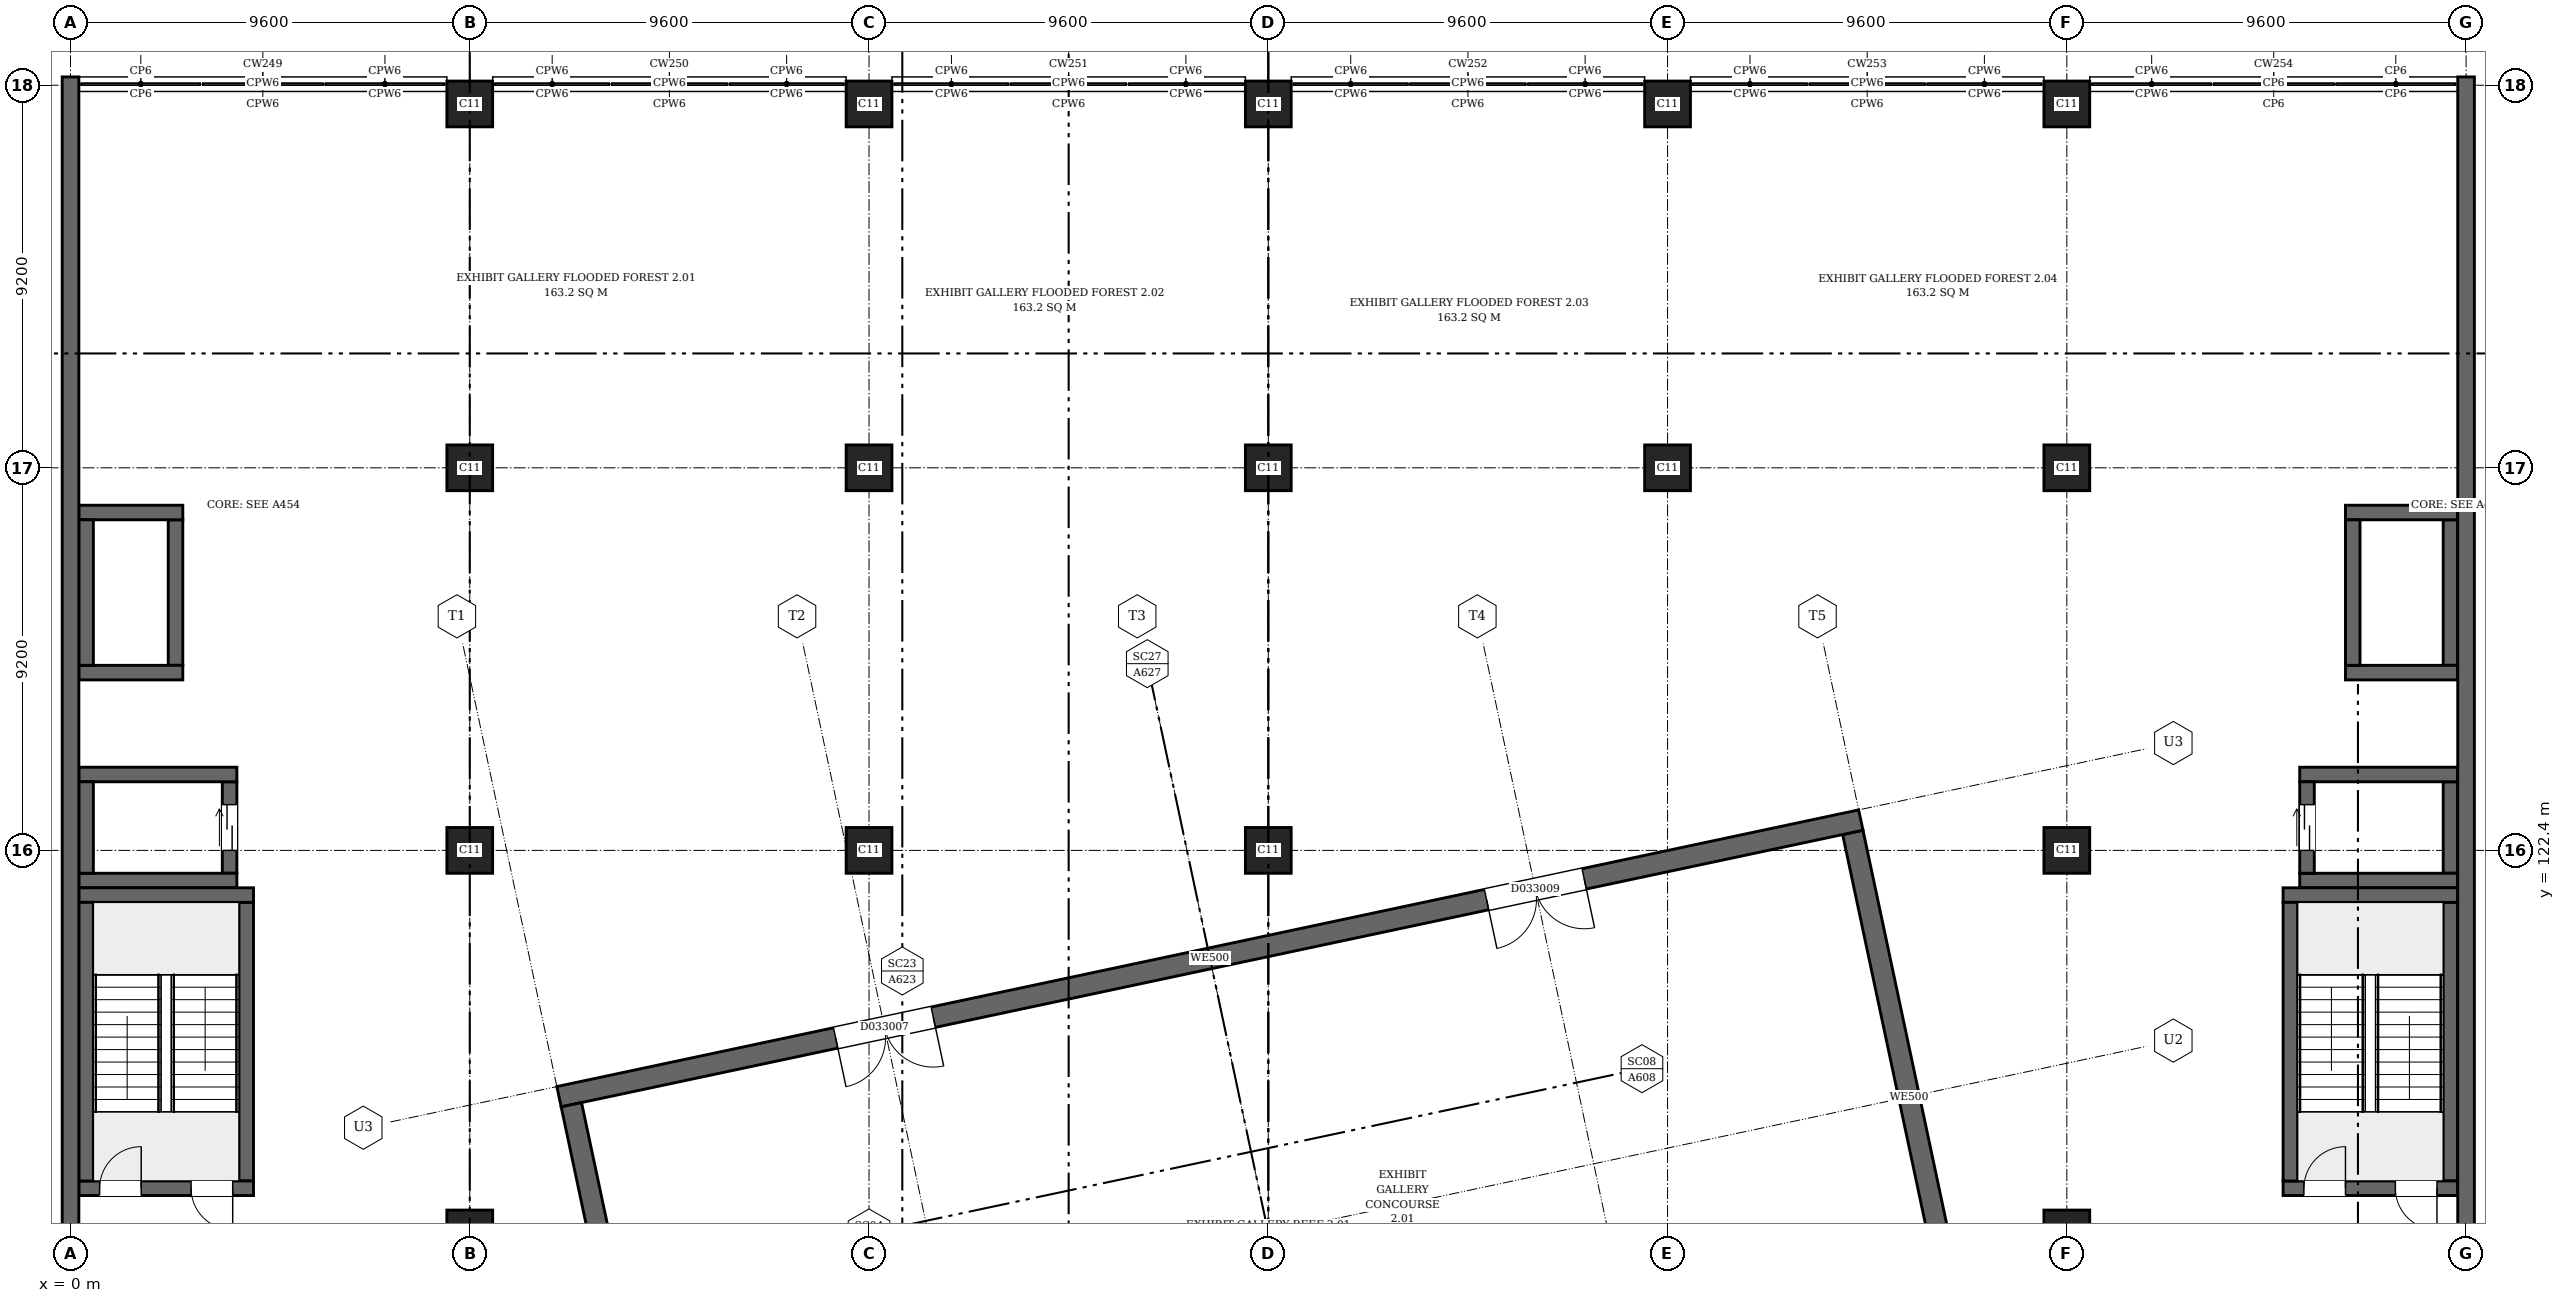
"""IFC4 building model, lengths in metres.
Left out: names, types, materials, properties, quantities, classifications, styles, units other than length and angle.
Written with IfcOpenShell. Run it as: python <this file> out.ifc"""

import sys

from ifc_helpers import new_model, si_unit, direction, frame, frame_2d, origin, origin_2d, place, context, subcontext, project, spatial, rectangle, extrude, element, fill, save


model = new_model("IFC4")
c1 = context("Model", 3, precision=1e-05, world=origin(), true_north=direction((0.0, 1.0)))
c2 = subcontext(c1, "Body", "Model", "MODEL_VIEW")
j1 = project(units=[si_unit("LENGTHUNIT", "METRE"), si_unit("PLANEANGLEUNIT", "RADIAN")], contexts=[c1])
p1 = place(None, origin())
s1 = spatial("IfcSite", under=j1, at=p1, CompositionType="ELEMENT")
p2 = place(p1, origin())
s2 = spatial("IfcBuilding", under=s1, at=p2, CompositionType="ELEMENT")
p3 = place(p2, frame((0.0, 0.0, 14.2)))
s3 = spatial("IfcBuildingStorey", under=s2, at=p3, CompositionType="ELEMENT", Elevation=14.2)
for number, where, z_axis, x_axis in (
    (1, (0.0, 94.12, 0.0), (0.0, 0.0, 1.0), (0.0, 1.0, 0.0)),
    (2, (57.6, 94.12, 0.0), (0.0, 0.0, 1.0), (0.0, 1.0, 0.0)),
):
    element("IfcWall", number, at=place(p3, frame(where, z_axis=z_axis, x_axis=x_axis)), inside=s3, PredefinedType="SHEAR", context=c2, shape_type="SweptSolid", body=[
        extrude(rectangle(XDim=46.88, YDim=0.4, at=frame_2d((23.44, 0.0))), origin(), (0.0, 0.0, 1.0), 7.5),
    ])
p4 = place(p3, frame((0.2, 114.275, 0.0), z_axis=(0.0, 0.0, 1.0), x_axis=(1.0, 0.0, 0.0)))
e3 = element("IfcWall", 3, at=p4, inside=s3, PredefinedType="SHEAR", context=c2, shape_type="SweptSolid", body=[
    extrude(rectangle(XDim=4.2, YDim=0.35, at=frame_2d((2.1, 0.0))), origin(), (0.0, 0.0, 1.0), 7.5),
])
p5 = place(p4, frame((0.5, 0.0, 0.0)))
e4 = element("IfcOpeningElement", 4, at=p5, cuts=e3, PredefinedType="OPENING", context=c2, shape_type="SweptSolid", body=[
    extrude(rectangle(XDim=1.0, YDim=2.1, at=frame_2d((0.5, 1.05))), frame((0.0, 0.185, 0.0), z_axis=(0.0, -1.0, 0.0), x_axis=(1.0, 0.0, 0.0)), (0.0, 0.0, 1.0), 0.37),
])
p6 = place(p4, frame((2.7, 0.0, 0.0)))
e5 = element("IfcOpeningElement", 5, at=p6, cuts=e3, PredefinedType="OPENING", context=c2, shape_type="SweptSolid", body=[
    extrude(rectangle(XDim=1.0, YDim=2.1, at=frame_2d((0.5, 1.05))), frame((0.0, 0.185, 0.0), z_axis=(0.0, -1.0, 0.0), x_axis=(1.0, 0.0, 0.0)), (0.0, 0.0, 1.0), 0.37),
])
p7 = place(p3, frame((0.2, 121.325, 0.0), z_axis=(0.0, 0.0, 1.0), x_axis=(1.0, 0.0, 0.0)))
e6 = element("IfcWall", 6, at=p7, inside=s3, PredefinedType="SHEAR", context=c2, shape_type="SweptSolid", body=[
    extrude(rectangle(XDim=4.2, YDim=0.35, at=frame_2d((2.1, 0.0))), origin(), (0.0, 0.0, 1.0), 7.5),
])
for number, where, z_axis, x_axis in (
    (7, (0.375, 114.45, 0.0), (0.0, 0.0, 1.0), (0.0, 1.0, 0.0)),
    (8, (4.225, 114.45, 0.0), (0.0, 0.0, 1.0), (0.0, 1.0, 0.0)),
):
    element("IfcWall", number, at=place(p3, frame(where, z_axis=z_axis, x_axis=x_axis)), inside=s3, PredefinedType="SHEAR", context=c2, shape_type="SweptSolid", body=[
        extrude(rectangle(XDim=6.7, YDim=0.35, at=frame_2d((3.35, 0.0))), origin(), (0.0, 0.0, 1.0), 7.5),
    ])
p8 = place(p3, frame((53.2, 114.275, 0.0), z_axis=(0.0, 0.0, 1.0), x_axis=(1.0, 0.0, 0.0)))
e9 = element("IfcWall", 9, at=p8, inside=s3, PredefinedType="SHEAR", context=c2, shape_type="SweptSolid", body=[
    extrude(rectangle(XDim=4.2, YDim=0.35, at=frame_2d((2.1, 0.0))), origin(), (0.0, 0.0, 1.0), 7.5),
])
p9 = place(p8, frame((0.5, 0.0, 0.0)))
e10 = element("IfcOpeningElement", 10, at=p9, cuts=e9, PredefinedType="OPENING", context=c2, shape_type="SweptSolid", body=[
    extrude(rectangle(XDim=1.0, YDim=2.1, at=frame_2d((0.5, 1.05))), frame((0.0, 0.185, 0.0), z_axis=(0.0, -1.0, 0.0), x_axis=(1.0, 0.0, 0.0)), (0.0, 0.0, 1.0), 0.37),
])
p10 = place(p8, frame((2.7, 0.0, 0.0)))
e11 = element("IfcOpeningElement", 11, at=p10, cuts=e9, PredefinedType="OPENING", context=c2, shape_type="SweptSolid", body=[
    extrude(rectangle(XDim=1.0, YDim=2.1, at=frame_2d((0.5, 1.05))), frame((0.0, 0.185, 0.0), z_axis=(0.0, -1.0, 0.0), x_axis=(1.0, 0.0, 0.0)), (0.0, 0.0, 1.0), 0.37),
])
p11 = place(p3, frame((53.2, 121.325, 0.0), z_axis=(0.0, 0.0, 1.0), x_axis=(1.0, 0.0, 0.0)))
e12 = element("IfcWall", 12, at=p11, inside=s3, PredefinedType="SHEAR", context=c2, shape_type="SweptSolid", body=[
    extrude(rectangle(XDim=4.2, YDim=0.35, at=frame_2d((2.1, 0.0))), origin(), (0.0, 0.0, 1.0), 7.5),
])
for number, where, z_axis, x_axis in (
    (13, (53.375, 114.45, 0.0), (0.0, 0.0, 1.0), (0.0, 1.0, 0.0)),
    (14, (57.225, 114.45, 0.0), (0.0, 0.0, 1.0), (0.0, 1.0, 0.0)),
):
    element("IfcWall", number, at=place(p3, frame(where, z_axis=z_axis, x_axis=x_axis)), inside=s3, PredefinedType="SHEAR", context=c2, shape_type="SweptSolid", body=[
        extrude(rectangle(XDim=6.7, YDim=0.35, at=frame_2d((3.35, 0.0))), origin(), (0.0, 0.0, 1.0), 7.5),
    ])
for number, where, z_axis, x_axis in (
    (15, (0.2, 121.675, 0.0), (0.0, 0.0, 1.0), (1.0, 0.0, 0.0)),
    (16, (0.2, 124.225, 0.0), (0.0, 0.0, 1.0), (1.0, 0.0, 0.0)),
):
    element("IfcWall", number, at=place(p3, frame(where, z_axis=z_axis, x_axis=x_axis)), inside=s3, PredefinedType="SHEAR", context=c2, shape_type="SweptSolid", body=[
        extrude(rectangle(XDim=3.8, YDim=0.35, at=frame_2d((1.9, 0.0))), origin(), (0.0, 0.0, 1.0), 7.5),
    ])
p12 = place(p3, frame((0.375, 121.85, 0.0), z_axis=(0.0, 0.0, 1.0), x_axis=(0.0, 1.0, 0.0)))
e17 = element("IfcWall", 17, at=p12, inside=s3, PredefinedType="SHEAR", context=c2, shape_type="SweptSolid", body=[
    extrude(rectangle(XDim=2.2, YDim=0.35, at=frame_2d((1.1, 0.0))), origin(), (0.0, 0.0, 1.0), 7.5),
])
p13 = place(p3, frame((3.825, 121.85, 0.0), z_axis=(0.0, 0.0, 1.0), x_axis=(0.0, 1.0, 0.0)))
e18 = element("IfcWall", 18, at=p13, inside=s3, PredefinedType="SHEAR", context=c2, shape_type="SweptSolid", body=[
    extrude(rectangle(XDim=2.2, YDim=0.35, at=frame_2d((1.1, 0.0))), origin(), (0.0, 0.0, 1.0), 7.5),
])
p14 = place(p13, frame((0.55, 0.0, 0.0)))
e19 = element("IfcOpeningElement", 19, at=p14, cuts=e18, PredefinedType="OPENING", context=c2, shape_type="SweptSolid", body=[
    extrude(rectangle(XDim=1.1, YDim=2.1, at=frame_2d((0.55, 1.05))), frame((0.0, 0.185, 0.0), z_axis=(0.0, -1.0, 0.0), x_axis=(1.0, 0.0, 0.0)), (0.0, 0.0, 1.0), 0.37),
])
for number, where, z_axis, x_axis in (
    (20, (53.6, 121.675, 0.0), (0.0, 0.0, 1.0), (1.0, 0.0, 0.0)),
    (21, (53.6, 124.225, 0.0), (0.0, 0.0, 1.0), (1.0, 0.0, 0.0)),
):
    element("IfcWall", number, at=place(p3, frame(where, z_axis=z_axis, x_axis=x_axis)), inside=s3, PredefinedType="SHEAR", context=c2, shape_type="SweptSolid", body=[
        extrude(rectangle(XDim=3.8, YDim=0.35, at=frame_2d((1.9, 0.0))), origin(), (0.0, 0.0, 1.0), 7.5),
    ])
p15 = place(p3, frame((53.775, 121.85, 0.0), z_axis=(0.0, 0.0, 1.0), x_axis=(0.0, 1.0, 0.0)))
e22 = element("IfcWall", 22, at=p15, inside=s3, PredefinedType="SHEAR", context=c2, shape_type="SweptSolid", body=[
    extrude(rectangle(XDim=2.2, YDim=0.35, at=frame_2d((1.1, 0.0))), origin(), (0.0, 0.0, 1.0), 7.5),
])
p16 = place(p15, frame((0.55, 0.0, 0.0)))
e23 = element("IfcOpeningElement", 23, at=p16, cuts=e22, PredefinedType="OPENING", context=c2, shape_type="SweptSolid", body=[
    extrude(rectangle(XDim=1.1, YDim=2.1, at=frame_2d((0.55, 1.05))), frame((0.0, 0.185, 0.0), z_axis=(0.0, -1.0, 0.0), x_axis=(1.0, 0.0, 0.0)), (0.0, 0.0, 1.0), 0.37),
])
p17 = place(p3, frame((57.225, 121.85, 0.0), z_axis=(0.0, 0.0, 1.0), x_axis=(0.0, 1.0, 0.0)))
e24 = element("IfcWall", 24, at=p17, inside=s3, PredefinedType="SHEAR", context=c2, shape_type="SweptSolid", body=[
    extrude(rectangle(XDim=2.2, YDim=0.35, at=frame_2d((1.1, 0.0))), origin(), (0.0, 0.0, 1.0), 7.5),
])
for number, where, z_axis, x_axis in (
    (25, (0.2, 126.675, 0.0), (0.0, 0.0, 1.0), (1.0, 0.0, 0.0)),
    (26, (0.2, 130.525, 0.0), (0.0, 0.0, 1.0), (1.0, 0.0, 0.0)),
):
    element("IfcWall", number, at=place(p3, frame(where, z_axis=z_axis, x_axis=x_axis)), inside=s3, PredefinedType="SHEAR", context=c2, shape_type="SweptSolid", body=[
        extrude(rectangle(XDim=2.5, YDim=0.35, at=frame_2d((1.25, 0.0))), origin(), (0.0, 0.0, 1.0), 7.5),
    ])
for number, where, z_axis, x_axis in (
    (27, (0.375, 126.85, 0.0), (0.0, 0.0, 1.0), (0.0, 1.0, 0.0)),
    (28, (2.525, 126.85, 0.0), (0.0, 0.0, 1.0), (0.0, 1.0, 0.0)),
):
    element("IfcWall", number, at=place(p3, frame(where, z_axis=z_axis, x_axis=x_axis)), inside=s3, PredefinedType="SHEAR", context=c2, shape_type="SweptSolid", body=[
        extrude(rectangle(XDim=3.5, YDim=0.35, at=frame_2d((1.75, 0.0))), origin(), (0.0, 0.0, 1.0), 7.5),
    ])
for number, where, z_axis, x_axis in (
    (29, (54.7, 126.675, 0.0), (0.0, 0.0, 1.0), (1.0, 0.0, 0.0)),
    (30, (54.7, 130.525, 0.0), (0.0, 0.0, 1.0), (1.0, 0.0, 0.0)),
):
    element("IfcWall", number, at=place(p3, frame(where, z_axis=z_axis, x_axis=x_axis)), inside=s3, PredefinedType="SHEAR", context=c2, shape_type="SweptSolid", body=[
        extrude(rectangle(XDim=2.7, YDim=0.35, at=frame_2d((1.35, 0.0))), origin(), (0.0, 0.0, 1.0), 7.5),
    ])
for number, where, z_axis, x_axis in (
    (31, (54.875, 126.85, 0.0), (0.0, 0.0, 1.0), (0.0, 1.0, 0.0)),
    (32, (57.225, 126.85, 0.0), (0.0, 0.0, 1.0), (0.0, 1.0, 0.0)),
):
    element("IfcWall", number, at=place(p3, frame(where, z_axis=z_axis, x_axis=x_axis)), inside=s3, PredefinedType="SHEAR", context=c2, shape_type="SweptSolid", body=[
        extrude(rectangle(XDim=3.5, YDim=0.35, at=frame_2d((1.75, 0.0))), origin(), (0.0, 0.0, 1.0), 7.5),
    ])
p18 = place(p3, frame((11.746, 116.476, 0.0), z_axis=(0.0, 0.0, 1.0), x_axis=(0.978146420121, 0.207917245089, 0.0)))
e33 = element("IfcWall", 33, at=p18, inside=s3, PredefinedType="SHEAR", context=c2, shape_type="SweptSolid", body=[
    extrude(rectangle(XDim=32.0, YDim=0.5, at=frame_2d((16.0, 0.0))), origin(), (0.0, 0.0, 1.0), 7.5),
])
p19 = place(p18, frame((6.8, 0.0, 0.0)))
e34 = element("IfcOpeningElement", 34, at=p19, cuts=e33, PredefinedType="OPENING", context=c2, shape_type="SweptSolid", body=[
    extrude(rectangle(XDim=2.4, YDim=2.4, at=frame_2d((1.2, 1.2))), frame((0.0, 0.26, 0.0), z_axis=(0.0, -1.0, 0.0), x_axis=(1.0, 0.0, 0.0)), (0.0, 0.0, 1.0), 0.52),
])
p20 = place(p18, frame((22.8, 0.0, 0.0)))
e35 = element("IfcOpeningElement", 35, at=p20, cuts=e33, PredefinedType="OPENING", context=c2, shape_type="SweptSolid", body=[
    extrude(rectangle(XDim=2.4, YDim=2.4, at=frame_2d((1.2, 1.2))), frame((0.0, 0.26, 0.0), z_axis=(0.0, -1.0, 0.0), x_axis=(1.0, 0.0, 0.0)), (0.0, 0.0, 1.0), 0.52),
])
p21 = place(p3, frame((14.746, 103.567, 0.0), z_axis=(0.0, 0.0, 1.0), x_axis=(-0.207911537827, 0.978147633253, 0.0)))
e36 = element("IfcWall", 36, at=p21, inside=s3, PredefinedType="SHEAR", context=c2, shape_type="SweptSolid", body=[
    extrude(rectangle(XDim=13.0, YDim=0.5, at=frame_2d((6.5, 0.0))), origin(), (0.0, 0.0, 1.0), 7.5),
])
p22 = place(p3, frame((45.557, 110.117, 0.0), z_axis=(0.0, 0.0, 1.0), x_axis=(-0.207915357117, 0.978146821431, 0.0)))
e37 = element("IfcWall", 37, at=p22, inside=s3, PredefinedType="SHEAR", context=c2, shape_type="SweptSolid", body=[
    extrude(rectangle(XDim=13.0, YDim=0.5, at=frame_2d((6.5, 0.0))), origin(), (0.0, 0.0, 1.0), 7.5),
])
for number, where, z_axis, x_axis in (
    (38, (9.6, 113.2, 0.0), (0.0, 0.0, 1.0), (1.0, 0.0, 0.0)),
    (39, (48.0, 113.2, 0.0), (0.0, 0.0, 1.0), (1.0, 0.0, 0.0)),
    (40, (9.6, 122.4, 0.0), (0.0, 0.0, 1.0), (1.0, 0.0, 0.0)),
    (41, (19.2, 122.4, 0.0), (0.0, 0.0, 1.0), (1.0, 0.0, 0.0)),
    (42, (28.8, 122.4, 0.0), (0.0, 0.0, 1.0), (1.0, 0.0, 0.0)),
    (43, (48.0, 122.4, 0.0), (0.0, 0.0, 1.0), (1.0, 0.0, 0.0)),
    (44, (9.6, 131.6, 0.0), (0.0, 0.0, 1.0), (1.0, 0.0, 0.0)),
    (45, (19.2, 131.6, 0.0), (0.0, 0.0, 1.0), (1.0, 0.0, 0.0)),
    (46, (28.8, 131.6, 0.0), (0.0, 0.0, 1.0), (1.0, 0.0, 0.0)),
    (47, (38.4, 131.6, 0.0), (0.0, 0.0, 1.0), (1.0, 0.0, 0.0)),
    (48, (48.0, 131.6, 0.0), (0.0, 0.0, 1.0), (1.0, 0.0, 0.0)),
    (49, (9.6, 140.35, 0.0), (0.0, 0.0, 1.0), (1.0, 0.0, 0.0)),
    (50, (19.2, 140.35, 0.0), (0.0, 0.0, 1.0), (1.0, 0.0, 0.0)),
    (51, (28.8, 140.35, 0.0), (0.0, 0.0, 1.0), (1.0, 0.0, 0.0)),
    (52, (38.4, 140.35, 0.0), (0.0, 0.0, 1.0), (1.0, 0.0, 0.0)),
    (53, (48.0, 140.35, 0.0), (0.0, 0.0, 1.0), (1.0, 0.0, 0.0)),
):
    element("IfcColumn", number, at=place(p3, frame(where, z_axis=z_axis, x_axis=x_axis)), inside=s3, PredefinedType="COLUMN", context=c2, shape_type="SweptSolid", body=[
        extrude(rectangle(XDim=1.1, YDim=1.1, at=origin_2d()), origin(), (0.0, 0.0, 1.0), 7.5),
    ])
p23 = place(p5, origin())
e54 = element("IfcDoor", 54, at=p23, inside=s3, OperationType="SINGLE_SWING_RIGHT", PredefinedType="DOOR", context=c2, shape_type="SweptSolid", body=[
    extrude(rectangle(XDim=1.0, YDim=2.1, at=frame_2d((0.5, 1.05))), frame((0.0, 0.025, 0.0), z_axis=(0.0, -1.0, 0.0), x_axis=(1.0, 0.0, 0.0)), (0.0, 0.0, 1.0), 0.05),
])
fill(e4, e54)
p24 = place(p6, origin())
e55 = element("IfcDoor", 55, at=p24, inside=s3, OperationType="SINGLE_SWING_LEFT", PredefinedType="DOOR", context=c2, shape_type="SweptSolid", body=[
    extrude(rectangle(XDim=1.0, YDim=2.1, at=frame_2d((0.5, 1.05))), frame((0.0, 0.025, 0.0), z_axis=(0.0, -1.0, 0.0), x_axis=(1.0, 0.0, 0.0)), (0.0, 0.0, 1.0), 0.05),
])
fill(e5, e55)
p25 = place(p9, origin())
e56 = element("IfcDoor", 56, at=p25, inside=s3, OperationType="SINGLE_SWING_RIGHT", PredefinedType="DOOR", context=c2, shape_type="SweptSolid", body=[
    extrude(rectangle(XDim=1.0, YDim=2.1, at=frame_2d((0.5, 1.05))), frame((0.0, 0.025, 0.0), z_axis=(0.0, -1.0, 0.0), x_axis=(1.0, 0.0, 0.0)), (0.0, 0.0, 1.0), 0.05),
])
fill(e10, e56)
p26 = place(p10, origin())
e57 = element("IfcDoor", 57, at=p26, inside=s3, OperationType="SINGLE_SWING_LEFT", PredefinedType="DOOR", context=c2, shape_type="SweptSolid", body=[
    extrude(rectangle(XDim=1.0, YDim=2.1, at=frame_2d((0.5, 1.05))), frame((0.0, 0.025, 0.0), z_axis=(0.0, -1.0, 0.0), x_axis=(1.0, 0.0, 0.0)), (0.0, 0.0, 1.0), 0.05),
])
fill(e11, e57)
p27 = place(p14, origin())
e58 = element("IfcDoor", 58, at=p27, inside=s3, OperationType="DOUBLE_DOOR_SLIDING", PredefinedType="DOOR", context=c2, shape_type="SweptSolid", body=[
    extrude(rectangle(XDim=1.1, YDim=2.1, at=frame_2d((0.55, 1.05))), frame((0.0, 0.025, 0.0), z_axis=(0.0, -1.0, 0.0), x_axis=(1.0, 0.0, 0.0)), (0.0, 0.0, 1.0), 0.05),
])
fill(e19, e58)
p28 = place(p16, origin())
e59 = element("IfcDoor", 59, at=p28, inside=s3, OperationType="DOUBLE_DOOR_SLIDING", PredefinedType="DOOR", context=c2, shape_type="SweptSolid", body=[
    extrude(rectangle(XDim=1.1, YDim=2.1, at=frame_2d((0.55, 1.05))), frame((0.0, 0.025, 0.0), z_axis=(0.0, -1.0, 0.0), x_axis=(1.0, 0.0, 0.0)), (0.0, 0.0, 1.0), 0.05),
])
fill(e23, e59)
p29 = place(p19, origin())
e60 = element("IfcDoor", 60, at=p29, inside=s3, OperationType="DOUBLE_DOOR_SINGLE_SWING", PredefinedType="DOOR", context=c2, shape_type="SweptSolid", body=[
    extrude(rectangle(XDim=2.4, YDim=2.4, at=frame_2d((1.2, 1.2))), frame((0.0, 0.025, 0.0), z_axis=(0.0, -1.0, 0.0), x_axis=(1.0, 0.0, 0.0)), (0.0, 0.0, 1.0), 0.05),
])
fill(e34, e60)
p30 = place(p20, origin())
e61 = element("IfcDoor", 61, at=p30, inside=s3, OperationType="DOUBLE_DOOR_SINGLE_SWING", PredefinedType="DOOR", context=c2, shape_type="SweptSolid", body=[
    extrude(rectangle(XDim=2.4, YDim=2.4, at=frame_2d((1.2, 1.2))), frame((0.0, 0.025, 0.0), z_axis=(0.0, -1.0, 0.0), x_axis=(1.0, 0.0, 0.0)), (0.0, 0.0, 1.0), 0.05),
])
fill(e35, e61)
save(model, sys.argv[1])
